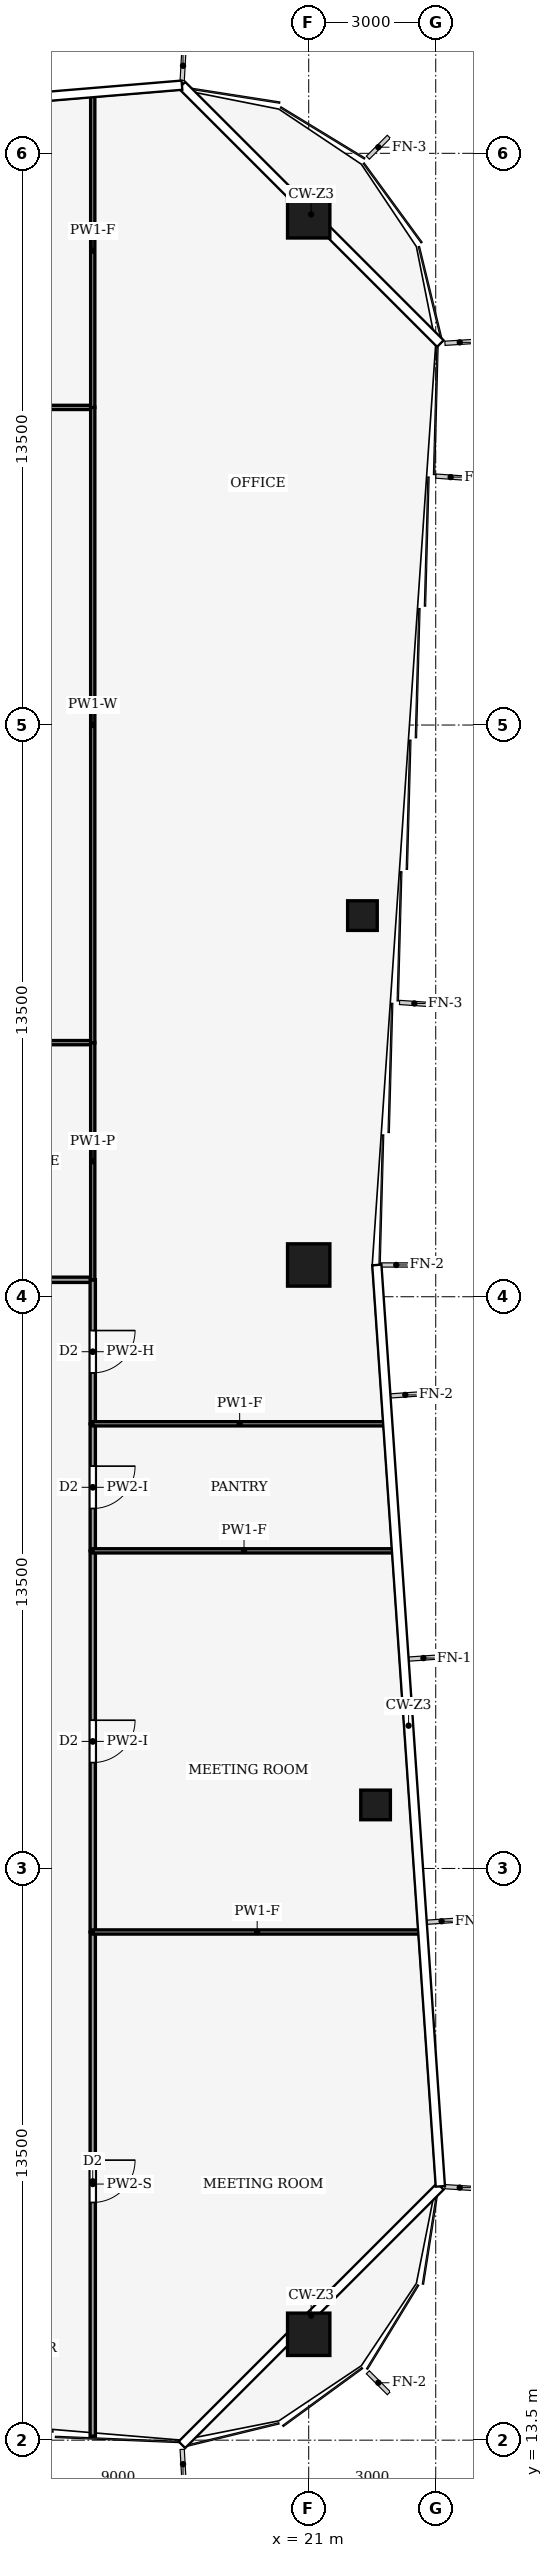
"""IFC4 building model, lengths in metres.
Left out: names, types, materials, properties, quantities, classifications, styles, units other than length and angle.
Written with IfcOpenShell. Run it as: python <this file> out.ifc"""

import sys

from ifc_helpers import new_model, si_unit, direction, frame, frame_2d, origin, origin_2d, place, context, subcontext, project, spatial, rectangle, hollow_rectangle, extrude, element, fill, save


model = new_model("IFC4")
c1 = context("Model", 3, precision=1e-05, world=origin(), true_north=direction((0.0, 1.0)))
c2 = subcontext(c1, "Body", "Model", "MODEL_VIEW")
j1 = project(units=[si_unit("LENGTHUNIT", "METRE"), si_unit("PLANEANGLEUNIT", "RADIAN")], contexts=[c1])
p1 = place(None, origin())
s1 = spatial("IfcSite", under=j1, at=p1, CompositionType="ELEMENT")
p2 = place(p1, origin())
s2 = spatial("IfcBuilding", under=s1, at=p2, CompositionType="ELEMENT")
p3 = place(p2, frame((0.0, 0.0, 182.0)))
s3 = spatial("IfcBuildingStorey", under=s2, at=p3, CompositionType="ELEMENT", Elevation=182.0)
for number, where, z_axis, x_axis in (
    (1, (21.0, 66.0, 0.0), (0.0, 0.0, 1.0), (1.0, 0.0, 0.0)),
    (2, (21.0, 41.25, 0.0), (0.0, 0.0, 1.0), (1.0, 0.0, 0.0)),
    (3, (21.0, 16.0, 0.0), (0.0, 0.0, 1.0), (1.0, 0.0, 0.0)),
):
    element("IfcColumn", number, at=place(p3, frame(where, z_axis=z_axis, x_axis=x_axis)), inside=s3, PredefinedType="COLUMN", context=c2, shape_type="SweptSolid", body=[
        extrude(hollow_rectangle(XDim=1.0, YDim=1.0, WallThickness=0.06, at=origin_2d()), origin(), (0.0, 0.0, 1.0), 4.0),
    ])
for number, where, z_axis, x_axis in (
    (4, (22.579, 28.5, 0.0), (0.0, 0.0, 1.0), (1.0, 0.0, 0.0)),
    (5, (22.269, 49.5, 0.0), (0.0, 0.0, 1.0), (1.0, 0.0, 0.0)),
):
    element("IfcColumn", number, at=place(p3, frame(where, z_axis=z_axis, x_axis=x_axis)), inside=s3, PredefinedType="COLUMN", context=c2, shape_type="SweptSolid", body=[
        extrude(hollow_rectangle(XDim=0.7, YDim=0.7, WallThickness=0.03, at=origin_2d()), origin(), (0.0, 0.0, 1.0), 4.0),
    ])
p4 = place(p3, frame((9.0, 40.9, 0.0), z_axis=(0.0, 0.0, 1.0), x_axis=(1.0, 0.0, 0.0)))
e6 = element("IfcWall", 6, at=p4, inside=s3, PredefinedType="PARTITIONING", context=c2, shape_type="SweptSolid", body=[
    extrude(rectangle(XDim=6.9, YDim=0.125, at=frame_2d((3.45, 0.0))), origin(), (0.0, 0.0, 1.0), 3.44),
])
p5 = place(p4, frame((2.95, 0.0, 0.0)))
e7 = element("IfcOpeningElement", 7, at=p5, cuts=e6, PredefinedType="OPENING", context=c2, shape_type="SweptSolid", body=[
    extrude(rectangle(XDim=1.0, YDim=2.1, at=frame_2d((0.5, 1.05))), frame((0.0, 0.073, 0.0), z_axis=(0.0, -1.0, 0.0), x_axis=(1.0, 0.0, 0.0)), (0.0, 0.0, 1.0), 0.145),
])
p6 = place(p3, frame((15.9, 25.5, 0.0), z_axis=(0.0, 0.0, 1.0), x_axis=(0.0, -1.0, 0.0)))
e8 = element("IfcWall", 8, at=p6, inside=s3, PredefinedType="PARTITIONING", context=c2, shape_type="SweptSolid", body=[
    extrude(rectangle(XDim=11.905, YDim=0.125, at=frame_2d((5.953, 0.0))), origin(), (0.0, 0.0, 1.0), 3.04),
])
p7 = place(p6, frame((5.387, 0.0, 0.0)))
e9 = element("IfcOpeningElement", 9, at=p7, cuts=e8, PredefinedType="OPENING", context=c2, shape_type="SweptSolid", body=[
    extrude(rectangle(XDim=1.0, YDim=2.1, at=frame_2d((0.5, 1.05))), frame((0.0, 0.073, 0.0), z_axis=(0.0, -1.0, 0.0), x_axis=(1.0, 0.0, 0.0)), (0.0, 0.0, 1.0), 0.145),
])
p8 = place(p3, frame((15.9, 34.5, 0.0), z_axis=(0.0, 0.0, 1.0), x_axis=(0.0, -1.0, 0.0)))
e10 = element("IfcWall", 10, at=p8, inside=s3, PredefinedType="PARTITIONING", context=c2, shape_type="SweptSolid", body=[
    extrude(rectangle(XDim=9.0, YDim=0.125, at=frame_2d((4.5, 0.0))), origin(), (0.0, 0.0, 1.0), 3.48),
])
p9 = place(p8, frame((4.0, 0.0, 0.0)))
e11 = element("IfcOpeningElement", 11, at=p9, cuts=e10, PredefinedType="OPENING", context=c2, shape_type="SweptSolid", body=[
    extrude(rectangle(XDim=1.0, YDim=2.1, at=frame_2d((0.5, 1.05))), frame((0.0, 0.073, 0.0), z_axis=(0.0, -1.0, 0.0), x_axis=(1.0, 0.0, 0.0)), (0.0, 0.0, 1.0), 0.145),
])
p10 = place(p3, frame((15.9, 37.5, 0.0), z_axis=(0.0, 0.0, 1.0), x_axis=(0.0, -1.0, 0.0)))
e12 = element("IfcWall", 12, at=p10, inside=s3, PredefinedType="PARTITIONING", context=c2, shape_type="SweptSolid", body=[
    extrude(rectangle(XDim=3.0, YDim=0.125, at=frame_2d((1.5, 0.0))), origin(), (0.0, 0.0, 1.0), 3.48),
])
p11 = place(p10, frame((1.0, 0.0, 0.0)))
e13 = element("IfcOpeningElement", 13, at=p11, cuts=e12, PredefinedType="OPENING", context=c2, shape_type="SweptSolid", body=[
    extrude(rectangle(XDim=1.0, YDim=2.1, at=frame_2d((0.5, 1.05))), frame((0.0, 0.073, 0.0), z_axis=(0.0, -1.0, 0.0), x_axis=(1.0, 0.0, 0.0)), (0.0, 0.0, 1.0), 0.145),
])
p12 = place(p3, frame((15.9, 40.904, 0.0), z_axis=(0.0, 0.0, 1.0), x_axis=(0.0, -1.0, 0.0)))
e14 = element("IfcWall", 14, at=p12, inside=s3, PredefinedType="PARTITIONING", context=c2, shape_type="SweptSolid", body=[
    extrude(rectangle(XDim=3.404, YDim=0.125, at=frame_2d((1.702, 0.0))), origin(), (0.0, 0.0, 1.0), 3.14),
])
p13 = place(p12, frame((1.202, 0.0, 0.0)))
e15 = element("IfcOpeningElement", 15, at=p13, cuts=e14, PredefinedType="OPENING", context=c2, shape_type="SweptSolid", body=[
    extrude(rectangle(XDim=1.0, YDim=2.1, at=frame_2d((0.5, 1.05))), frame((0.0, 0.073, 0.0), z_axis=(0.0, -1.0, 0.0), x_axis=(1.0, 0.0, 0.0)), (0.0, 0.0, 1.0), 0.145),
])
p14 = place(p3, frame((15.9, 46.5, 0.0), z_axis=(0.0, 0.0, 1.0), x_axis=(-1.0, 0.0, 0.0)))
e16 = element("IfcWall", 16, at=p14, inside=s3, PredefinedType="PARTITIONING", context=c2, shape_type="SweptSolid", body=[
    extrude(rectangle(XDim=6.904, YDim=0.1, at=frame_2d((3.452, 0.0))), origin(), (0.0, 0.0, 1.0), 3.44),
])
p15 = place(p3, frame((15.9, 40.896, 0.0), z_axis=(0.0, 0.0, 1.0), x_axis=(0.0, 1.0, 0.0)))
e17 = element("IfcWall", 17, at=p15, inside=s3, PredefinedType="PARTITIONING", context=c2, shape_type="SweptSolid", body=[
    extrude(rectangle(XDim=5.608, YDim=0.1, at=frame_2d((2.804, 0.0))), origin(), (0.0, 0.0, 1.0), 3.44),
])
p16 = place(p3, frame((3.0, 61.5, 0.0), z_axis=(0.0, 0.0, 1.0), x_axis=(1.0, 0.0, 0.0)))
e18 = element("IfcWall", 18, at=p16, inside=s3, PredefinedType="PARTITIONING", context=c2, shape_type="SweptSolid", body=[
    extrude(rectangle(XDim=12.9, YDim=0.1, at=frame_2d((6.45, 0.0))), origin(), (0.0, 0.0, 1.0), 3.24),
])
p17 = place(p16, frame((5.95, 0.0, 0.0)))
e19 = element("IfcOpeningElement", 19, at=p17, cuts=e18, PredefinedType="OPENING", context=c2, shape_type="SweptSolid", body=[
    extrude(rectangle(XDim=1.0, YDim=2.1, at=frame_2d((0.5, 1.05))), frame((0.0, 0.06, 0.0), z_axis=(0.0, -1.0, 0.0), x_axis=(1.0, 0.0, 0.0)), (0.0, 0.0, 1.0), 0.12),
])
p18 = place(p3, frame((15.9, 46.496, 0.0), z_axis=(0.0, 0.0, 1.0), x_axis=(0.0, 1.0, 0.0)))
e20 = element("IfcWall", 20, at=p18, inside=s3, PredefinedType="PARTITIONING", context=c2, shape_type="SweptSolid", body=[
    extrude(rectangle(XDim=15.008, YDim=0.1, at=frame_2d((7.504, 0.0))), origin(), (0.0, 0.0, 1.0), 3.24),
])
p19 = place(p3, frame((15.9, 61.496, 0.0), z_axis=(0.0, 0.0, 1.0), x_axis=(0.0, 1.0, 0.0)))
e21 = element("IfcWall", 21, at=p19, inside=s3, PredefinedType="PARTITIONING", context=c2, shape_type="SweptSolid", body=[
    extrude(rectangle(XDim=7.409, YDim=0.1, at=frame_2d((3.705, 0.0))), origin(), (0.0, 0.0, 1.0), 3.04),
])
p20 = place(p3, frame((23.666, 25.5, 0.0), z_axis=(0.0, 0.0, 1.0), x_axis=(-1.0, 0.0, 0.0)))
e22 = element("IfcWall", 22, at=p20, inside=s3, PredefinedType="PARTITIONING", context=c2, shape_type="SweptSolid", body=[
    extrude(rectangle(XDim=7.766, YDim=0.1, at=frame_2d((3.883, 0.0))), origin(), (0.0, 0.0, 1.0), 3.04),
])
p21 = place(p3, frame((23.045, 34.5, 0.0), z_axis=(0.0, 0.0, 1.0), x_axis=(-1.0, 0.0, 0.0)))
e23 = element("IfcWall", 23, at=p21, inside=s3, PredefinedType="PARTITIONING", context=c2, shape_type="SweptSolid", body=[
    extrude(rectangle(XDim=7.146, YDim=0.1, at=frame_2d((3.573, 0.0))), origin(), (0.0, 0.0, 1.0), 3.04),
])
p22 = place(p3, frame((22.839, 37.5, 0.0), z_axis=(0.0, 0.0, 1.0), x_axis=(-1.0, 0.0, 0.0)))
e24 = element("IfcWall", 24, at=p22, inside=s3, PredefinedType="PARTITIONING", context=c2, shape_type="SweptSolid", body=[
    extrude(rectangle(XDim=6.939, YDim=0.1, at=frame_2d((3.469, 0.0))), origin(), (0.0, 0.0, 1.0), 3.04),
])
p23 = place(p7, origin())
e25 = element("IfcDoor", 25, at=p23, inside=s3, OperationType="SINGLE_SWING_LEFT", PredefinedType="DOOR", context=c2, shape_type="SweptSolid", body=[
    extrude(rectangle(XDim=1.0, YDim=2.1, at=frame_2d((0.5, 1.05))), frame((0.0, 0.025, 0.0), z_axis=(0.0, -1.0, 0.0), x_axis=(1.0, 0.0, 0.0)), (0.0, 0.0, 1.0), 0.05),
])
fill(e9, e25)
p24 = place(p9, origin())
e26 = element("IfcDoor", 26, at=p24, inside=s3, OperationType="SINGLE_SWING_LEFT", PredefinedType="DOOR", context=c2, shape_type="SweptSolid", body=[
    extrude(rectangle(XDim=1.0, YDim=2.1, at=frame_2d((0.5, 1.05))), frame((0.0, 0.025, 0.0), z_axis=(0.0, -1.0, 0.0), x_axis=(1.0, 0.0, 0.0)), (0.0, 0.0, 1.0), 0.05),
])
fill(e11, e26)
p25 = place(p11, origin())
e27 = element("IfcDoor", 27, at=p25, inside=s3, OperationType="SINGLE_SWING_RIGHT", PredefinedType="DOOR", context=c2, shape_type="SweptSolid", body=[
    extrude(rectangle(XDim=1.0, YDim=2.1, at=frame_2d((0.5, 1.05))), frame((0.0, 0.025, 0.0), z_axis=(0.0, -1.0, 0.0), x_axis=(1.0, 0.0, 0.0)), (0.0, 0.0, 1.0), 0.05),
])
fill(e13, e27)
p26 = place(p13, origin())
e28 = element("IfcDoor", 28, at=p26, inside=s3, OperationType="SINGLE_SWING_LEFT", PredefinedType="DOOR", context=c2, shape_type="SweptSolid", body=[
    extrude(rectangle(XDim=1.0, YDim=2.1, at=frame_2d((0.5, 1.05))), frame((0.0, 0.025, 0.0), z_axis=(0.0, -1.0, 0.0), x_axis=(1.0, 0.0, 0.0)), (0.0, 0.0, 1.0), 0.05),
])
fill(e15, e28)
save(model, sys.argv[1])
